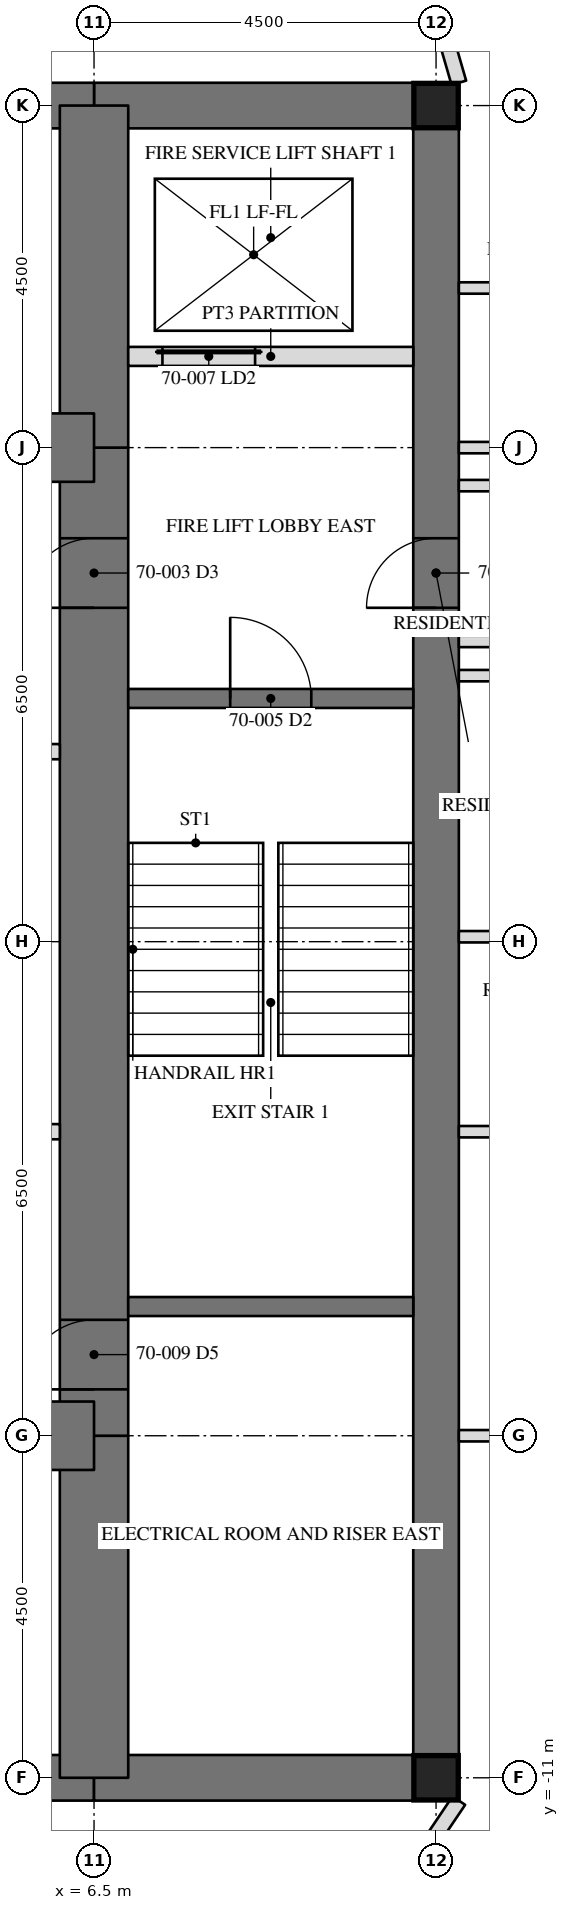
"""IFC4 building model, lengths in metres.
Left out: names, types, materials, properties, quantities, classifications, styles, units other than length and angle.
Written with IfcOpenShell. Run it as: python <this file> out.ifc"""

import sys

from ifc_helpers import new_model, si_unit, direction, frame, frame_2d, origin, origin_2d, place, context, subcontext, project, spatial, rectangle, hollow_rectangle, extrude, element, fill, save


model = new_model("IFC4")
c1 = context("Model", 3, precision=1e-05, world=origin(), true_north=direction((0.0, 1.0)))
c2 = subcontext(c1, "Body", "Model", "MODEL_VIEW")
j1 = project(units=[si_unit("LENGTHUNIT", "METRE"), si_unit("PLANEANGLEUNIT", "RADIAN")], contexts=[c1])
p1 = place(None, origin())
s1 = spatial("IfcSite", under=j1, at=p1, CompositionType="ELEMENT")
p2 = place(p1, origin())
s2 = spatial("IfcBuilding", under=s1, at=p2, CompositionType="ELEMENT")
p3 = place(p2, frame((0.0, 0.0, 284.8)))
s3 = spatial("IfcBuildingStorey", under=s2, at=p3, CompositionType="ELEMENT", Elevation=284.8)
p4 = place(p3, frame((11.0, -11.0, 0.0), z_axis=(0.0, 0.0, 1.0), x_axis=(0.0, 1.0, 0.0)))
e1 = element("IfcWall", 1, at=p4, inside=s3, PredefinedType="SHEAR", context=c2, shape_type="SweptSolid", body=[
    extrude(rectangle(XDim=22.0, YDim=0.6, at=frame_2d((11.0, 0.0))), origin(), (0.0, 0.0, 1.0), 3.6),
])
p5 = place(p4, frame((15.393, 0.0, 0.0)))
e2 = element("IfcOpeningElement", 2, at=p5, cuts=e1, PredefinedType="OPENING", context=c2, shape_type="SweptSolid", body=[
    extrude(rectangle(XDim=0.915, YDim=2.134, at=frame_2d((0.458, 1.067))), frame((0.0, 0.31, 0.0), z_axis=(0.0, -1.0, 0.0), x_axis=(1.0, 0.0, 0.0)), (0.0, 0.0, 1.0), 0.62),
])
p6 = place(p3, frame((11.0, 11.0, 0.0), z_axis=(0.0, 0.0, 1.0), x_axis=(-1.0, 0.0, 0.0)))
e3 = element("IfcWall", 3, at=p6, inside=s3, PredefinedType="SHEAR", context=c2, shape_type="SweptSolid", body=[
    extrude(rectangle(XDim=4.5, YDim=0.6, at=frame_2d((2.25, 0.0))), origin(), (0.0, 0.0, 1.0), 3.6),
])
p7 = place(p3, frame((6.5, 11.0, 0.0), z_axis=(0.0, 0.0, 1.0), x_axis=(-1.0, 0.0, 0.0)))
e4 = element("IfcWall", 4, at=p7, inside=s3, PredefinedType="SHEAR", context=c2, shape_type="SweptSolid", body=[
    extrude(rectangle(XDim=13.0, YDim=0.6, at=frame_2d((6.5, 0.0))), origin(), (0.0, 0.0, 1.0), 3.6),
])
p8 = place(p7, frame((6.0, 0.0, 0.0)))
e5 = element("IfcOpeningElement", 5, at=p8, cuts=e4, PredefinedType="OPENING", context=c2, shape_type="SweptSolid", body=[
    extrude(rectangle(XDim=1.0, YDim=2.134, at=frame_2d((0.5, 1.067))), frame((0.0, 0.31, 0.0), z_axis=(0.0, -1.0, 0.0), x_axis=(1.0, 0.0, 0.0)), (0.0, 0.0, 1.0), 0.62),
])
p9 = place(p3, frame((-6.5, -11.0, 0.0), z_axis=(0.0, 0.0, 1.0), x_axis=(1.0, 0.0, 0.0)))
e6 = element("IfcWall", 6, at=p9, inside=s3, PredefinedType="SHEAR", context=c2, shape_type="SweptSolid", body=[
    extrude(rectangle(XDim=13.0, YDim=0.6, at=frame_2d((6.5, 0.0))), origin(), (0.0, 0.0, 1.0), 3.6),
])
p10 = place(p9, frame((6.0, 0.0, 0.0)))
e7 = element("IfcOpeningElement", 7, at=p10, cuts=e6, PredefinedType="OPENING", context=c2, shape_type="SweptSolid", body=[
    extrude(rectangle(XDim=1.0, YDim=2.134, at=frame_2d((0.5, 1.067))), frame((0.0, 0.31, 0.0), z_axis=(0.0, -1.0, 0.0), x_axis=(1.0, 0.0, 0.0)), (0.0, 0.0, 1.0), 0.62),
])
p11 = place(p3, frame((6.5, -11.0, 0.0), z_axis=(0.0, 0.0, 1.0), x_axis=(1.0, 0.0, 0.0)))
e8 = element("IfcWall", 8, at=p11, inside=s3, PredefinedType="SHEAR", context=c2, shape_type="SweptSolid", body=[
    extrude(rectangle(XDim=4.5, YDim=0.6, at=frame_2d((2.25, 0.0))), origin(), (0.0, 0.0, 1.0), 3.6),
])
p12 = place(p3, frame((6.5, -11.0, 0.0), z_axis=(0.0, 0.0, 1.0), x_axis=(0.0, 1.0, 0.0)))
e9 = element("IfcWall", 9, at=p12, inside=s3, PredefinedType="SHEAR", context=c2, shape_type="SweptSolid", body=[
    extrude(rectangle(XDim=4.5, YDim=0.9, at=frame_2d((2.25, 0.0))), origin(), (0.0, 0.0, 1.0), 3.6),
])
p13 = place(p3, frame((6.5, -6.5, 0.0), z_axis=(0.0, 0.0, 1.0), x_axis=(0.0, 1.0, 0.0)))
e10 = element("IfcWall", 10, at=p13, inside=s3, PredefinedType="SHEAR", context=c2, shape_type="SweptSolid", body=[
    extrude(rectangle(XDim=13.0, YDim=0.9, at=frame_2d((6.5, 0.0))), origin(), (0.0, 0.0, 1.0), 3.6),
])
p14 = place(p13, frame((10.893, 0.0, 0.0)))
e11 = element("IfcOpeningElement", 11, at=p14, cuts=e10, PredefinedType="OPENING", context=c2, shape_type="SweptSolid", body=[
    extrude(rectangle(XDim=0.915, YDim=2.134, at=frame_2d((0.458, 1.067))), frame((0.0, 0.46, 0.0), z_axis=(0.0, -1.0, 0.0), x_axis=(1.0, 0.0, 0.0)), (0.0, 0.0, 1.0), 0.92),
])
p15 = place(p13, frame((0.61, 0.0, 0.0)))
e12 = element("IfcOpeningElement", 12, at=p15, cuts=e10, PredefinedType="OPENING", context=c2, shape_type="SweptSolid", body=[
    extrude(rectangle(XDim=0.915, YDim=2.134, at=frame_2d((0.458, 1.067))), frame((0.0, 0.46, 0.0), z_axis=(0.0, -1.0, 0.0), x_axis=(1.0, 0.0, 0.0)), (0.0, 0.0, 1.0), 0.92),
])
p16 = place(p3, frame((6.5, 6.5, 0.0), z_axis=(0.0, 0.0, 1.0), x_axis=(0.0, 1.0, 0.0)))
e13 = element("IfcWall", 13, at=p16, inside=s3, PredefinedType="SHEAR", context=c2, shape_type="SweptSolid", body=[
    extrude(rectangle(XDim=4.5, YDim=0.9, at=frame_2d((2.25, 0.0))), origin(), (0.0, 0.0, 1.0), 3.6),
])
p17 = place(p3, frame((6.5, 6.5, 0.0), z_axis=(0.0, 0.0, 1.0), x_axis=(-1.0, 0.0, 0.0)))
e14 = element("IfcWall", 14, at=p17, inside=s3, PredefinedType="SHEAR", context=c2, shape_type="SweptSolid", body=[
    extrude(rectangle(XDim=13.0, YDim=0.9, at=frame_2d((6.5, 0.0))), origin(), (0.0, 0.0, 1.0), 3.6),
])
p18 = place(p17, frame((6.042, 0.0, 0.0)))
e15 = element("IfcOpeningElement", 15, at=p18, cuts=e14, PredefinedType="OPENING", context=c2, shape_type="SweptSolid", body=[
    extrude(rectangle(XDim=0.915, YDim=2.134, at=frame_2d((0.458, 1.067))), frame((0.0, 0.46, 0.0), z_axis=(0.0, -1.0, 0.0), x_axis=(1.0, 0.0, 0.0)), (0.0, 0.0, 1.0), 0.92),
])
p19 = place(p17, frame((9.766, 0.0, 0.0)))
e16 = element("IfcOpeningElement", 16, at=p19, cuts=e14, PredefinedType="OPENING", context=c2, shape_type="SweptSolid", body=[
    extrude(rectangle(XDim=1.118, YDim=2.134, at=frame_2d((0.559, 1.067))), frame((0.0, 0.46, 0.0), z_axis=(0.0, -1.0, 0.0), x_axis=(1.0, 0.0, 0.0)), (0.0, 0.0, 1.0), 0.92),
])
p20 = place(p17, frame((2.218, 0.0, 0.0)))
e17 = element("IfcOpeningElement", 17, at=p20, cuts=e14, PredefinedType="OPENING", context=c2, shape_type="SweptSolid", body=[
    extrude(rectangle(XDim=0.915, YDim=2.134, at=frame_2d((0.458, 1.067))), frame((0.0, 0.46, 0.0), z_axis=(0.0, -1.0, 0.0), x_axis=(1.0, 0.0, 0.0)), (0.0, 0.0, 1.0), 0.92),
])
p21 = place(p3, frame((-6.5, -6.5, 0.0), z_axis=(0.0, 0.0, 1.0), x_axis=(1.0, 0.0, 0.0)))
e18 = element("IfcWall", 18, at=p21, inside=s3, PredefinedType="SHEAR", context=c2, shape_type="SweptSolid", body=[
    extrude(rectangle(XDim=13.0, YDim=0.9, at=frame_2d((6.5, 0.0))), origin(), (0.0, 0.0, 1.0), 3.6),
])
p22 = place(p21, frame((6.042, 0.0, 0.0)))
e19 = element("IfcOpeningElement", 19, at=p22, cuts=e18, PredefinedType="OPENING", context=c2, shape_type="SweptSolid", body=[
    extrude(rectangle(XDim=0.915, YDim=2.134, at=frame_2d((0.458, 1.067))), frame((0.0, 0.46, 0.0), z_axis=(0.0, -1.0, 0.0), x_axis=(1.0, 0.0, 0.0)), (0.0, 0.0, 1.0), 0.92),
])
p23 = place(p21, frame((1.917, 0.0, 0.0)))
e20 = element("IfcOpeningElement", 20, at=p23, cuts=e18, PredefinedType="OPENING", context=c2, shape_type="SweptSolid", body=[
    extrude(rectangle(XDim=0.915, YDim=2.134, at=frame_2d((0.458, 1.067))), frame((0.0, 0.46, 0.0), z_axis=(0.0, -1.0, 0.0), x_axis=(1.0, 0.0, 0.0)), (0.0, 0.0, 1.0), 0.92),
])
p24 = place(p21, frame((9.567, 0.0, 0.0)))
e21 = element("IfcOpeningElement", 21, at=p24, cuts=e18, PredefinedType="OPENING", context=c2, shape_type="SweptSolid", body=[
    extrude(rectangle(XDim=0.915, YDim=2.134, at=frame_2d((0.458, 1.067))), frame((0.0, 0.46, 0.0), z_axis=(0.0, -1.0, 0.0), x_axis=(1.0, 0.0, 0.0)), (0.0, 0.0, 1.0), 0.92),
])
for number, where, z_axis, x_axis in (
    (22, (11.0, 11.0, 0.0), (0.0, 0.0, 1.0), (1.0, 0.0, 0.0)),
    (23, (11.0, -11.0, 0.0), (0.0, 0.0, 1.0), (1.0, 0.0, 0.0)),
):
    element("IfcColumn", number, at=place(p3, frame(where, z_axis=z_axis, x_axis=x_axis)), inside=s3, PredefinedType="COLUMN", context=c2, shape_type="SweptSolid", body=[
        extrude(hollow_rectangle(XDim=0.584, YDim=0.584, WallThickness=0.051, at=origin_2d()), origin(), (0.0, 0.0, 1.0), 3.6),
    ])
p25 = place(p3, frame((6.95, -4.8, 0.0), z_axis=(0.0, 0.0, 1.0), x_axis=(1.0, 0.0, 0.0)))
e24 = element("IfcWall", 24, at=p25, inside=s3, PredefinedType="SOLIDWALL", context=c2, shape_type="SweptSolid", body=[
    extrude(rectangle(XDim=3.75, YDim=0.25, at=frame_2d((1.875, 0.0))), origin(), (0.0, 0.0, 1.0), 3.41),
])
p26 = place(p3, frame((6.95, 3.2, 0.0), z_axis=(0.0, 0.0, 1.0), x_axis=(1.0, 0.0, 0.0)))
e25 = element("IfcWall", 25, at=p26, inside=s3, PredefinedType="SOLIDWALL", context=c2, shape_type="SweptSolid", body=[
    extrude(rectangle(XDim=3.75, YDim=0.25, at=frame_2d((1.875, 0.0))), origin(), (0.0, 0.0, 1.0), 3.41),
])
p27 = place(p26, frame((1.342, 0.0, 0.0)))
e26 = element("IfcOpeningElement", 26, at=p27, cuts=e25, PredefinedType="OPENING", context=c2, shape_type="SweptSolid", body=[
    extrude(rectangle(XDim=1.067, YDim=2.134, at=frame_2d((0.533, 1.067))), frame((0.0, 0.135, 0.0), z_axis=(0.0, -1.0, 0.0), x_axis=(1.0, 0.0, 0.0)), (0.0, 0.0, 1.0), 0.27),
])
p28 = place(p3, frame((6.95, 7.7, 0.0), z_axis=(0.0, 0.0, 1.0), x_axis=(1.0, 0.0, 0.0)))
e27 = element("IfcWall", 27, at=p28, inside=s3, PredefinedType="PARTITIONING", context=c2, shape_type="SweptSolid", body=[
    extrude(rectangle(XDim=3.75, YDim=0.25, at=frame_2d((1.875, 0.0))), origin(), (0.0, 0.0, 1.0), 3.41),
])
p29 = place(p28, frame((0.45, 0.0, 0.0)))
e28 = element("IfcOpeningElement", 28, at=p29, cuts=e27, PredefinedType="OPENING", context=c2, shape_type="SweptSolid", body=[
    extrude(rectangle(XDim=1.219, YDim=2.134, at=frame_2d((0.609, 1.067))), frame((0.0, 0.135, 0.0), z_axis=(0.0, -1.0, 0.0), x_axis=(1.0, 0.0, 0.0)), (0.0, 0.0, 1.0), 0.27),
])
p30 = place(p3, frame((-6.05, 2.5, 0.0), z_axis=(0.0, 0.0, 1.0), x_axis=(1.0, 0.0, 0.0)))
e29 = element("IfcWall", 29, at=p30, inside=s3, PredefinedType="PARTITIONING", context=c2, shape_type="SweptSolid", body=[
    extrude(rectangle(XDim=12.1, YDim=0.2, at=frame_2d((6.05, 0.0))), origin(), (0.0, 0.0, 1.0), 3.41),
])
p31 = place(p30, frame((1.408, 0.0, 0.0)))
e30 = element("IfcOpeningElement", 30, at=p31, cuts=e29, PredefinedType="OPENING", context=c2, shape_type="SweptSolid", body=[
    extrude(rectangle(XDim=1.067, YDim=2.134, at=frame_2d((0.533, 1.067))), frame((0.0, 0.11, 0.0), z_axis=(0.0, -1.0, 0.0), x_axis=(1.0, 0.0, 0.0)), (0.0, 0.0, 1.0), 0.22),
])
p32 = place(p30, frame((5.517, 0.0, 0.0)))
e31 = element("IfcOpeningElement", 31, at=p32, cuts=e29, PredefinedType="OPENING", context=c2, shape_type="SweptSolid", body=[
    extrude(rectangle(XDim=1.067, YDim=2.134, at=frame_2d((0.533, 1.067))), frame((0.0, 0.11, 0.0), z_axis=(0.0, -1.0, 0.0), x_axis=(1.0, 0.0, 0.0)), (0.0, 0.0, 1.0), 0.22),
])
p33 = place(p30, frame((9.625, 0.0, 0.0)))
e32 = element("IfcOpeningElement", 32, at=p33, cuts=e29, PredefinedType="OPENING", context=c2, shape_type="SweptSolid", body=[
    extrude(rectangle(XDim=1.067, YDim=2.134, at=frame_2d((0.533, 1.067))), frame((0.0, 0.11, 0.0), z_axis=(0.0, -1.0, 0.0), x_axis=(1.0, 0.0, 0.0)), (0.0, 0.0, 1.0), 0.22),
])
p34 = place(p3, frame((6.05, -2.5, 0.0), z_axis=(0.0, 0.0, 1.0), x_axis=(-1.0, 0.0, 0.0)))
e33 = element("IfcWall", 33, at=p34, inside=s3, PredefinedType="PARTITIONING", context=c2, shape_type="SweptSolid", body=[
    extrude(rectangle(XDim=12.1, YDim=0.2, at=frame_2d((6.05, 0.0))), origin(), (0.0, 0.0, 1.0), 3.41),
])
p35 = place(p34, frame((9.625, 0.0, 0.0)))
e34 = element("IfcOpeningElement", 34, at=p35, cuts=e33, PredefinedType="OPENING", context=c2, shape_type="SweptSolid", body=[
    extrude(rectangle(XDim=1.067, YDim=2.134, at=frame_2d((0.533, 1.067))), frame((0.0, 0.11, 0.0), z_axis=(0.0, -1.0, 0.0), x_axis=(1.0, 0.0, 0.0)), (0.0, 0.0, 1.0), 0.22),
])
p36 = place(p34, frame((5.517, 0.0, 0.0)))
e35 = element("IfcOpeningElement", 35, at=p36, cuts=e33, PredefinedType="OPENING", context=c2, shape_type="SweptSolid", body=[
    extrude(rectangle(XDim=1.067, YDim=2.134, at=frame_2d((0.533, 1.067))), frame((0.0, 0.11, 0.0), z_axis=(0.0, -1.0, 0.0), x_axis=(1.0, 0.0, 0.0)), (0.0, 0.0, 1.0), 0.22),
])
p37 = place(p34, frame((1.408, 0.0, 0.0)))
e36 = element("IfcOpeningElement", 36, at=p37, cuts=e33, PredefinedType="OPENING", context=c2, shape_type="SweptSolid", body=[
    extrude(rectangle(XDim=1.067, YDim=2.134, at=frame_2d((0.533, 1.067))), frame((0.0, 0.11, 0.0), z_axis=(0.0, -1.0, 0.0), x_axis=(1.0, 0.0, 0.0)), (0.0, 0.0, 1.0), 0.22),
])
p38 = place(p3, frame((11.3, 11.3, 0.0), z_axis=(0.0, 0.0, 1.0), x_axis=(-0.278099250491, 0.960552344683, 0.0)))
e37 = element("IfcWall", 37, at=p38, inside=s3, PredefinedType="PARTITIONING", context=c2, shape_type="SweptSolid", body=[
    extrude(rectangle(XDim=1.584, YDim=0.2, at=frame_2d((0.792, 0.0))), origin(), (0.0, 0.0, 1.0), 3.41),
])
p39 = place(p3, frame((11.3, -11.3, 0.0), z_axis=(0.0, 0.0, 1.0), x_axis=(-0.558834300538, -0.829279340477, 0.0)))
e38 = element("IfcWall", 38, at=p39, inside=s3, PredefinedType="PARTITIONING", context=c2, shape_type="SweptSolid", body=[
    extrude(rectangle(XDim=3.048, YDim=0.2, at=frame_2d((1.524, 0.0))), origin(), (0.0, 0.0, 1.0), 2.704),
])
p40 = place(p3, frame((11.3, -6.5, 0.0), z_axis=(0.0, 0.0, 1.0), x_axis=(1.0, 0.0, 0.0)))
e39 = element("IfcWall", 39, at=p40, inside=s3, PredefinedType="PARTITIONING", context=c2, shape_type="SweptSolid", body=[
    extrude(rectangle(XDim=5.615, YDim=0.15, at=frame_2d((2.808, 0.0))), origin(), (0.0, 0.0, 1.0), 2.966),
])
p41 = place(p40, frame((2.742, 0.0, 0.0)))
e40 = element("IfcOpeningElement", 40, at=p41, cuts=e39, PredefinedType="OPENING", context=c2, shape_type="SweptSolid", body=[
    extrude(rectangle(XDim=0.915, YDim=2.134, at=frame_2d((0.458, 1.067))), frame((0.0, 0.085, 0.0), z_axis=(0.0, -1.0, 0.0), x_axis=(1.0, 0.0, 0.0)), (0.0, 0.0, 1.0), 0.17),
])
p42 = place(p3, frame((11.3, 0.065, 0.0), z_axis=(0.0, 0.0, 1.0), x_axis=(1.0, 0.0, 0.0)))
e41 = element("IfcWall", 41, at=p42, inside=s3, PredefinedType="PARTITIONING", context=c2, shape_type="SweptSolid", body=[
    extrude(rectangle(XDim=5.615, YDim=0.15, at=frame_2d((2.808, 0.0))), origin(), (0.0, 0.0, 1.0), 2.709),
])
p43 = place(p42, frame((3.042, 0.0, 0.0)))
e42 = element("IfcOpeningElement", 42, at=p43, cuts=e41, PredefinedType="OPENING", context=c2, shape_type="SweptSolid", body=[
    extrude(rectangle(XDim=0.915, YDim=2.134, at=frame_2d((0.458, 1.067))), frame((0.0, 0.085, 0.0), z_axis=(0.0, -1.0, 0.0), x_axis=(1.0, 0.0, 0.0)), (0.0, 0.0, 1.0), 0.17),
])
p44 = place(p42, frame((4.058, 0.0, 0.0)))
e43 = element("IfcOpeningElement", 43, at=p44, cuts=e41, PredefinedType="OPENING", context=c2, shape_type="SweptSolid", body=[
    extrude(rectangle(XDim=0.915, YDim=2.134, at=frame_2d((0.458, 1.067))), frame((0.0, 0.085, 0.0), z_axis=(0.0, -1.0, 0.0), x_axis=(1.0, 0.0, 0.0)), (0.0, 0.0, 1.0), 0.17),
])
p45 = place(p3, frame((11.3, 6.5, 0.0), z_axis=(0.0, 0.0, 1.0), x_axis=(1.0, 0.0, 0.0)))
e44 = element("IfcWall", 44, at=p45, inside=s3, PredefinedType="PARTITIONING", context=c2, shape_type="SweptSolid", body=[
    extrude(rectangle(XDim=5.615, YDim=0.15, at=frame_2d((2.808, 0.0))), origin(), (0.0, 0.0, 1.0), 2.966),
])
p46 = place(p45, frame((2.742, 0.0, 0.0)))
e45 = element("IfcOpeningElement", 45, at=p46, cuts=e44, PredefinedType="OPENING", context=c2, shape_type="SweptSolid", body=[
    extrude(rectangle(XDim=0.915, YDim=2.134, at=frame_2d((0.458, 1.067))), frame((0.0, 0.085, 0.0), z_axis=(0.0, -1.0, 0.0), x_axis=(1.0, 0.0, 0.0)), (0.0, 0.0, 1.0), 0.17),
])
for number, where, z_axis, x_axis in (
    (46, (11.3, 3.95, 0.0), (0.0, 0.0, 1.0), (1.0, 0.0, 0.0)),
    (47, (11.3, 6.0, 0.0), (0.0, 0.0, 1.0), (1.0, 0.0, 0.0)),
):
    element("IfcWall", number, at=place(p3, frame(where, z_axis=z_axis, x_axis=x_axis)), inside=s3, PredefinedType="PARTITIONING", context=c2, shape_type="SweptSolid", body=[
        extrude(rectangle(XDim=1.525, YDim=0.15, at=frame_2d((0.762, 0.0))), origin(), (0.0, 0.0, 1.0), 3.41),
    ])
p47 = place(p3, frame((11.3, 3.5, 0.0), z_axis=(0.0, 0.0, 1.0), x_axis=(1.0, 0.0, 0.0)))
e48 = element("IfcWall", 48, at=p47, inside=s3, PredefinedType="PARTITIONING", context=c2, shape_type="SweptSolid", body=[
    extrude(rectangle(XDim=2.725, YDim=0.15, at=frame_2d((1.362, 0.0))), origin(), (0.0, 0.0, 1.0), 3.41),
])
p48 = place(p3, frame((11.3, 8.6, 0.0), z_axis=(0.0, 0.0, 1.0), x_axis=(1.0, 0.0, 0.0)))
e49 = element("IfcWall", 49, at=p48, inside=s3, PredefinedType="PARTITIONING", context=c2, shape_type="SweptSolid", body=[
    extrude(rectangle(XDim=1.925, YDim=0.15, at=frame_2d((0.962, 0.0))), origin(), (0.0, 0.0, 1.0), 3.41),
])
p49 = place(p3, frame((11.3, -2.5, 0.0), z_axis=(0.0, 0.0, 1.0), x_axis=(1.0, 0.0, 0.0)))
e50 = element("IfcWall", 50, at=p49, inside=s3, PredefinedType="PARTITIONING", context=c2, shape_type="SweptSolid", body=[
    extrude(rectangle(XDim=2.375, YDim=0.15, at=frame_2d((1.188, 0.0))), origin(), (0.0, 0.0, 1.0), 3.41),
])
p50 = place(p5, origin())
e51 = element("IfcDoor", 51, at=p50, inside=s3, OperationType="SINGLE_SWING_RIGHT", PredefinedType="DOOR", context=c2, shape_type="SweptSolid", body=[
    extrude(rectangle(XDim=0.915, YDim=2.134, at=frame_2d((0.458, 1.067))), frame((0.0, -0.225, 0.0), z_axis=(0.0, -1.0, 0.0), x_axis=(1.0, 0.0, 0.0)), (0.0, 0.0, 1.0), 0.05),
])
fill(e2, e51)
p51 = place(p14, origin())
e52 = element("IfcDoor", 52, at=p51, inside=s3, OperationType="SINGLE_SWING_RIGHT", PredefinedType="DOOR", context=c2, shape_type="SweptSolid", body=[
    extrude(rectangle(XDim=0.915, YDim=2.134, at=frame_2d((0.458, 1.067))), frame((0.0, -0.375, 0.0), z_axis=(0.0, -1.0, 0.0), x_axis=(1.0, 0.0, 0.0)), (0.0, 0.0, 1.0), 0.05),
])
fill(e11, e52)
p52 = place(p27, origin())
e53 = element("IfcDoor", 53, at=p52, inside=s3, OperationType="SINGLE_SWING_LEFT", PredefinedType="DOOR", context=c2, shape_type="SweptSolid", body=[
    extrude(rectangle(XDim=1.067, YDim=2.134, at=frame_2d((0.533, 1.067))), frame((0.0, 0.025, 0.0), z_axis=(0.0, -1.0, 0.0), x_axis=(1.0, 0.0, 0.0)), (0.0, 0.0, 1.0), 0.05),
])
fill(e26, e53)
p53 = place(p29, origin())
e54 = element("IfcDoor", 54, at=p53, inside=s3, OperationType="SLIDING_TO_LEFT", PredefinedType="DOOR", context=c2, shape_type="SweptSolid", body=[
    extrude(rectangle(XDim=1.219, YDim=2.134, at=frame_2d((0.609, 1.067))), frame((0.0, 0.025, 0.0), z_axis=(0.0, -1.0, 0.0), x_axis=(1.0, 0.0, 0.0)), (0.0, 0.0, 1.0), 0.05),
])
fill(e28, e54)
p54 = place(p15, origin())
e55 = element("IfcDoor", 55, at=p54, inside=s3, OperationType="SINGLE_SWING_RIGHT", PredefinedType="DOOR", context=c2, shape_type="SweptSolid", body=[
    extrude(rectangle(XDim=0.915, YDim=2.134, at=frame_2d((0.458, 1.067))), frame((0.0, -0.375, 0.0), z_axis=(0.0, -1.0, 0.0), x_axis=(1.0, 0.0, 0.0)), (0.0, 0.0, 1.0), 0.05),
])
fill(e12, e55)
save(model, sys.argv[1])
